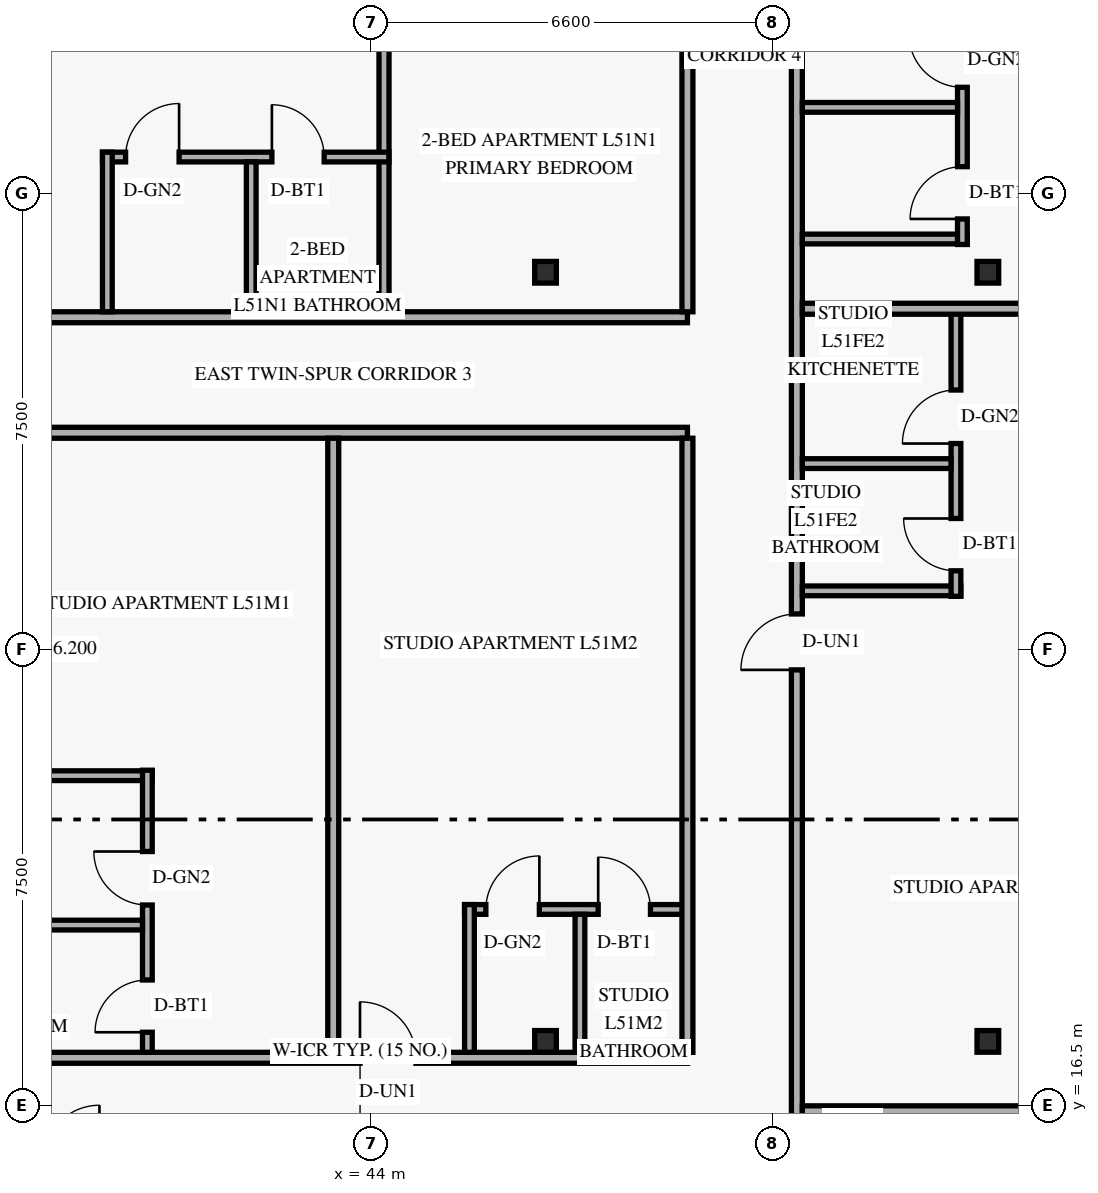
"""IFC4 building model, lengths in metres.
Left out: names, types, materials, properties, quantities, classifications, styles, units other than length and angle.
Written with IfcOpenShell. Run it as: python <this file> out.ifc"""

import sys

from ifc_helpers import new_model, si_unit, direction, frame, frame_2d, origin, origin_2d, place, context, subcontext, project, spatial, rectangle, hollow_rectangle, extrude, element, fill, save


model = new_model("IFC4")
c1 = context("Model", 3, precision=1e-05, world=origin(), true_north=direction((0.0, 1.0)))
c2 = subcontext(c1, "Body", "Model", "MODEL_VIEW")
j1 = project(units=[si_unit("LENGTHUNIT", "METRE"), si_unit("PLANEANGLEUNIT", "RADIAN")], contexts=[c1])
p1 = place(None, origin())
s1 = spatial("IfcSite", under=j1, at=p1, CompositionType="ELEMENT")
p2 = place(p1, origin())
s2 = spatial("IfcBuilding", under=s1, at=p2, CompositionType="ELEMENT")
p3 = place(p2, frame((0.0, 0.0, 196.2)))
s3 = spatial("IfcBuildingStorey", under=s2, at=p3, CompositionType="ELEMENT", Elevation=196.2)
for number, where, z_axis, x_axis in (
    (1, (46.803, 17.55, 0.0), (0.035, 0.0, 0.999), (0.0, 1.0, 0.0)),
    (2, (46.803, 30.2, 0.0), (0.035, 0.0, 0.999), (0.0, 1.0, 0.0)),
):
    element("IfcColumn", number, at=place(p3, frame(where, z_axis=z_axis, x_axis=x_axis)), inside=s3, PredefinedType="COLUMN", context=c2, shape_type="SweptSolid", body=[
        extrude(hollow_rectangle(XDim=0.356, YDim=0.356, WallThickness=0.016, at=origin_2d()), origin(), (0.0, 0.0, 1.0), 3.602),
    ])
for number, where, z_axis, x_axis in (
    (3, (54.036, 17.55, 0.0), (0.058, 0.0, 0.998), (0.0, 1.0, 0.0)),
    (4, (54.036, 30.2, 0.0), (0.058, 0.0, 0.998), (0.0, 1.0, 0.0)),
):
    element("IfcColumn", number, at=place(p3, frame(where, z_axis=z_axis, x_axis=x_axis)), inside=s3, PredefinedType="COLUMN", context=c2, shape_type="SweptSolid", body=[
        extrude(hollow_rectangle(XDim=0.356, YDim=0.356, WallThickness=0.016, at=origin_2d()), origin(), (0.0, 0.0, 1.0), 3.606),
    ])
p4 = place(p3, frame((37.64, 17.28, 0.0), z_axis=(0.0, 0.0, 1.0), x_axis=(1.0, 0.0, 0.0)))
e5 = element("IfcWall", 5, at=p4, inside=s3, PredefinedType="STANDARD", context=c2, shape_type="SweptSolid", body=[
    extrude(rectangle(XDim=11.56, YDim=0.18, at=frame_2d((5.78, 0.0))), origin(), (0.0, 0.0, 1.0), 2.67),
])
p5 = place(p4, frame((6.175, 0.0, 0.0)))
e6 = element("IfcOpeningElement", 6, at=p5, cuts=e5, PredefinedType="OPENING", context=c2, shape_type="SweptSolid", body=[
    extrude(rectangle(XDim=0.92, YDim=2.15, at=frame_2d((0.46, 1.075))), frame((0.0, 0.1, 0.0), z_axis=(0.0, -1.0, 0.0), x_axis=(1.0, 0.0, 0.0)), (0.0, 0.0, 1.0), 0.2),
])
p6 = place(p3, frame((37.64, 27.56, 0.0), z_axis=(0.0, 0.0, 1.0), x_axis=(1.0, 0.0, 0.0)))
e7 = element("IfcWall", 7, at=p6, inside=s3, PredefinedType="STANDARD", context=c2, shape_type="SweptSolid", body=[
    extrude(rectangle(XDim=11.56, YDim=0.18, at=frame_2d((5.78, 0.0))), origin(), (0.0, 0.0, 1.0), 2.67),
])
p7 = place(p3, frame((35.51, 29.46, 0.0), z_axis=(0.0, 0.0, 1.0), x_axis=(1.0, 0.0, 0.0)))
e8 = element("IfcWall", 8, at=p7, inside=s3, PredefinedType="STANDARD", context=c2, shape_type="SweptSolid", body=[
    extrude(rectangle(XDim=13.69, YDim=0.18, at=frame_2d((6.845, 0.0))), origin(), (0.0, 0.0, 1.0), 2.67),
])
p8 = place(p7, frame((0.32, 0.0, 0.0)))
e9 = element("IfcOpeningElement", 9, at=p8, cuts=e8, PredefinedType="OPENING", context=c2, shape_type="SweptSolid", body=[
    extrude(rectangle(XDim=0.92, YDim=2.15, at=frame_2d((0.46, 1.075))), frame((0.0, 0.1, 0.0), z_axis=(0.0, -1.0, 0.0), x_axis=(1.0, 0.0, 0.0)), (0.0, 0.0, 1.0), 0.2),
])
p9 = place(p3, frame((44.21, 29.55, 0.0), z_axis=(0.0, 0.0, 1.0), x_axis=(0.0, 1.0, 0.0)))
e10 = element("IfcWall", 10, at=p9, inside=s3, PredefinedType="PARTITIONING", context=c2, shape_type="SweptSolid", body=[
    extrude(rectangle(XDim=14.17, YDim=0.165, at=frame_2d((7.085, 0.0))), origin(), (0.0, 0.0, 1.0), 2.67),
])
p10 = place(p9, frame((4.593, 0.0, 0.0)))
e11 = element("IfcOpeningElement", 11, at=p10, cuts=e10, PredefinedType="OPENING", context=c2, shape_type="SweptSolid", body=[
    extrude(rectangle(XDim=0.88, YDim=2.14, at=frame_2d((0.44, 1.07))), frame((0.0, 0.093, 0.0), z_axis=(0.0, -1.0, 0.0), x_axis=(1.0, 0.0, 0.0)), (0.0, 0.0, 1.0), 0.185),
])
p11 = place(p9, frame((10.47, 0.0, 0.0)))
e12 = element("IfcOpeningElement", 12, at=p11, cuts=e10, PredefinedType="OPENING", context=c2, shape_type="SweptSolid", body=[
    extrude(rectangle(XDim=0.88, YDim=2.14, at=frame_2d((0.44, 1.07))), frame((0.0, 0.093, 0.0), z_axis=(0.0, -1.0, 0.0), x_axis=(1.0, 0.0, 0.0)), (0.0, 0.0, 1.0), 0.185),
])
p12 = place(p3, frame((39.58, 32.095, 0.0), z_axis=(0.0, 0.0, 1.0), x_axis=(1.0, 0.0, 0.0)))
e13 = element("IfcWall", 13, at=p12, inside=s3, PredefinedType="PLUMBINGWALL", context=c2, shape_type="SweptSolid", body=[
    extrude(rectangle(XDim=4.71, YDim=0.16, at=frame_2d((2.355, 0.0))), origin(), (0.0, 0.0, 1.0), 3.3),
])
p13 = place(p12, frame((0.38, 0.0, 0.0)))
e14 = element("IfcOpeningElement", 14, at=p13, cuts=e13, PredefinedType="OPENING", context=c2, shape_type="SweptSolid", body=[
    extrude(rectangle(XDim=0.88, YDim=2.12, at=frame_2d((0.44, 1.06))), frame((0.0, 0.09, 0.0), z_axis=(0.0, -1.0, 0.0), x_axis=(1.0, 0.0, 0.0)), (0.0, 0.0, 1.0), 0.18),
])
p14 = place(p12, frame((2.786, 0.0, 0.0)))
e15 = element("IfcOpeningElement", 15, at=p14, cuts=e13, PredefinedType="OPENING", context=c2, shape_type="SweptSolid", body=[
    extrude(rectangle(XDim=0.86, YDim=2.12, at=frame_2d((0.43, 1.06))), frame((0.0, 0.09, 0.0), z_axis=(0.0, -1.0, 0.0), x_axis=(1.0, 0.0, 0.0)), (0.0, 0.0, 1.0), 0.18),
])
p15 = place(p3, frame((39.66, 29.55, 0.0), z_axis=(0.0, 0.0, 1.0), x_axis=(0.0, 1.0, 0.0)))
e16 = element("IfcWall", 16, at=p15, inside=s3, PredefinedType="PLUMBINGWALL", context=c2, shape_type="SweptSolid", body=[
    extrude(rectangle(XDim=2.625, YDim=0.16, at=frame_2d((1.312, 0.0))), origin(), (0.0, 0.0, 1.0), 2.67),
])
p16 = place(p3, frame((42.026, 29.55, 0.0), z_axis=(0.0, 0.0, 1.0), x_axis=(0.0, 1.0, 0.0)))
e17 = element("IfcWall", 17, at=p16, inside=s3, PredefinedType="PLUMBINGWALL", context=c2, shape_type="SweptSolid", body=[
    extrude(rectangle(XDim=2.465, YDim=0.16, at=frame_2d((1.232, 0.0))), origin(), (0.0, 0.0, 1.0), 2.67),
])
p17 = place(p3, frame((43.375, 17.37, 0.0), z_axis=(0.0, 0.0, 1.0), x_axis=(0.0, 1.0, 0.0)))
e18 = element("IfcWall", 18, at=p17, inside=s3, PredefinedType="PARTITIONING", context=c2, shape_type="SweptSolid", body=[
    extrude(rectangle(XDim=10.1, YDim=0.18, at=frame_2d((5.05, 0.0))), origin(), (0.0, 0.0, 1.0), 2.67),
])
p18 = place(p3, frame((37.64, 21.92, 0.0), z_axis=(0.0, 0.0, 1.0), x_axis=(1.0, 0.0, 0.0)))
e19 = element("IfcWall", 19, at=p18, inside=s3, PredefinedType="PLUMBINGWALL", context=c2, shape_type="SweptSolid", body=[
    extrude(rectangle(XDim=2.758, YDim=0.16, at=frame_2d((1.379, 0.0))), origin(), (0.0, 0.0, 1.0), 3.3),
])
p19 = place(p3, frame((40.318, 17.37, 0.0), z_axis=(0.0, 0.0, 1.0), x_axis=(0.0, 1.0, 0.0)))
e20 = element("IfcWall", 20, at=p19, inside=s3, PredefinedType="PLUMBINGWALL", context=c2, shape_type="SweptSolid", body=[
    extrude(rectangle(XDim=4.64, YDim=0.16, at=frame_2d((2.32, 0.0))), origin(), (0.0, 0.0, 1.0), 2.67),
])
p20 = place(p19, frame((0.33, 0.0, 0.0)))
e21 = element("IfcOpeningElement", 21, at=p20, cuts=e20, PredefinedType="OPENING", context=c2, shape_type="SweptSolid", body=[
    extrude(rectangle(XDim=0.86, YDim=2.12, at=frame_2d((0.43, 1.06))), frame((0.0, 0.09, 0.0), z_axis=(0.0, -1.0, 0.0), x_axis=(1.0, 0.0, 0.0)), (0.0, 0.0, 1.0), 0.18),
])
p21 = place(p19, frame((2.423, 0.0, 0.0)))
e22 = element("IfcOpeningElement", 22, at=p21, cuts=e20, PredefinedType="OPENING", context=c2, shape_type="SweptSolid", body=[
    extrude(rectangle(XDim=0.88, YDim=2.12, at=frame_2d((0.44, 1.06))), frame((0.0, 0.09, 0.0), z_axis=(0.0, -1.0, 0.0), x_axis=(1.0, 0.0, 0.0)), (0.0, 0.0, 1.0), 0.18),
])
p22 = place(p3, frame((37.64, 19.463, 0.0), z_axis=(0.0, 0.0, 1.0), x_axis=(1.0, 0.0, 0.0)))
e23 = element("IfcWall", 23, at=p22, inside=s3, PredefinedType="PLUMBINGWALL", context=c2, shape_type="SweptSolid", body=[
    extrude(rectangle(XDim=2.598, YDim=0.16, at=frame_2d((1.299, 0.0))), origin(), (0.0, 0.0, 1.0), 3.3),
])
p23 = place(p3, frame((45.535, 19.72, 0.0), z_axis=(0.0, 0.0, 1.0), x_axis=(1.0, 0.0, 0.0)))
e24 = element("IfcWall", 24, at=p23, inside=s3, PredefinedType="PLUMBINGWALL", context=c2, shape_type="SweptSolid", body=[
    extrude(rectangle(XDim=3.665, YDim=0.16, at=frame_2d((1.833, 0.0))), origin(), (0.0, 0.0, 1.0), 2.67),
])
p24 = place(p23, frame((0.35, 0.0, 0.0)))
e25 = element("IfcOpeningElement", 25, at=p24, cuts=e24, PredefinedType="OPENING", context=c2, shape_type="SweptSolid", body=[
    extrude(rectangle(XDim=0.88, YDim=2.12, at=frame_2d((0.44, 1.06))), frame((0.0, 0.09, 0.0), z_axis=(0.0, -1.0, 0.0), x_axis=(1.0, 0.0, 0.0)), (0.0, 0.0, 1.0), 0.18),
])
p25 = place(p23, frame((2.198, 0.0, 0.0)))
e26 = element("IfcOpeningElement", 26, at=p25, cuts=e24, PredefinedType="OPENING", context=c2, shape_type="SweptSolid", body=[
    extrude(rectangle(XDim=0.86, YDim=2.12, at=frame_2d((0.43, 1.06))), frame((0.0, 0.09, 0.0), z_axis=(0.0, -1.0, 0.0), x_axis=(1.0, 0.0, 0.0)), (0.0, 0.0, 1.0), 0.18),
])
p26 = place(p3, frame((45.615, 17.37, 0.0), z_axis=(0.0, 0.0, 1.0), x_axis=(0.0, 1.0, 0.0)))
e27 = element("IfcWall", 27, at=p26, inside=s3, PredefinedType="PLUMBINGWALL", context=c2, shape_type="SweptSolid", body=[
    extrude(rectangle(XDim=2.43, YDim=0.16, at=frame_2d((1.215, 0.0))), origin(), (0.0, 0.0, 1.0), 2.67),
])
p27 = place(p3, frame((47.432, 17.37, 0.0), z_axis=(0.0, 0.0, 1.0), x_axis=(0.0, 1.0, 0.0)))
e28 = element("IfcWall", 28, at=p27, inside=s3, PredefinedType="PLUMBINGWALL", context=c2, shape_type="SweptSolid", body=[
    extrude(rectangle(XDim=2.27, YDim=0.16, at=frame_2d((1.135, 0.0))), origin(), (0.0, 0.0, 1.0), 2.67),
])
p28 = place(p3, frame((51.0, 4.28, 0.0), z_axis=(0.0, 0.0, 1.0), x_axis=(0.0, 1.0, 0.0)))
e29 = element("IfcWall", 29, at=p28, inside=s3, PredefinedType="STANDARD", context=c2, shape_type="SweptSolid", body=[
    extrude(rectangle(XDim=39.44, YDim=0.18, at=frame_2d((19.72, 0.0))), origin(), (0.0, 0.0, 1.0), 2.67),
])
p29 = place(p28, frame((6.08, 0.0, 0.0)))
e30 = element("IfcOpeningElement", 30, at=p29, cuts=e29, PredefinedType="OPENING", context=c2, shape_type="SweptSolid", body=[
    extrude(rectangle(XDim=0.92, YDim=2.15, at=frame_2d((0.46, 1.075))), frame((0.0, 0.1, 0.0), z_axis=(0.0, -1.0, 0.0), x_axis=(1.0, 0.0, 0.0)), (0.0, 0.0, 1.0), 0.2),
])
p30 = place(p28, frame((19.38, 0.0, 0.0)))
e31 = element("IfcOpeningElement", 31, at=p30, cuts=e29, PredefinedType="OPENING", context=c2, shape_type="SweptSolid", body=[
    extrude(rectangle(XDim=0.92, YDim=2.15, at=frame_2d((0.46, 1.075))), frame((0.0, 0.1, 0.0), z_axis=(0.0, -1.0, 0.0), x_axis=(1.0, 0.0, 0.0)), (0.0, 0.0, 1.0), 0.2),
])
p31 = place(p28, frame((31.534, 0.0, 0.0)))
e32 = element("IfcOpeningElement", 32, at=p31, cuts=e29, PredefinedType="OPENING", context=c2, shape_type="SweptSolid", body=[
    extrude(rectangle(XDim=0.92, YDim=2.15, at=frame_2d((0.46, 1.075))), frame((0.0, 0.1, 0.0), z_axis=(0.0, -1.0, 0.0), x_axis=(1.0, 0.0, 0.0)), (0.0, 0.0, 1.0), 0.2),
])
p32 = place(p3, frame((49.2, 17.37, 0.0), z_axis=(0.0, 0.0, 1.0), x_axis=(0.0, 1.0, 0.0)))
e33 = element("IfcWall", 33, at=p32, inside=s3, PredefinedType="STANDARD", context=c2, shape_type="SweptSolid", body=[
    extrude(rectangle(XDim=10.1, YDim=0.18, at=frame_2d((5.05, 0.0))), origin(), (0.0, 0.0, 1.0), 2.67),
])
p33 = place(p3, frame((49.2, 29.55, 0.0), z_axis=(0.0, 0.0, 1.0), x_axis=(0.0, 1.0, 0.0)))
e34 = element("IfcWall", 34, at=p33, inside=s3, PredefinedType="STANDARD", context=c2, shape_type="SweptSolid", body=[
    extrude(rectangle(XDim=14.17, YDim=0.18, at=frame_2d((7.085, 0.0))), origin(), (0.0, 0.0, 1.0), 2.67),
])
p34 = place(p3, frame((53.57, 11.57, 0.0), z_axis=(0.0, 0.0, 1.0), x_axis=(0.0, 1.0, 0.0)))
e35 = element("IfcWall", 35, at=p34, inside=s3, PredefinedType="PLUMBINGWALL", context=c2, shape_type="SweptSolid", body=[
    extrude(rectangle(XDim=4.83, YDim=0.16, at=frame_2d((2.415, 0.0))), origin(), (0.0, 0.0, 1.0), 2.924),
])
p35 = place(p34, frame((0.42, 0.0, 0.0)))
e36 = element("IfcOpeningElement", 36, at=p35, cuts=e35, PredefinedType="OPENING", context=c2, shape_type="SweptSolid", body=[
    extrude(rectangle(XDim=0.86, YDim=2.12, at=frame_2d((0.43, 1.06))), frame((0.0, 0.09, 0.0), z_axis=(0.0, -1.0, 0.0), x_axis=(1.0, 0.0, 0.0)), (0.0, 0.0, 1.0), 0.18),
])
p36 = place(p34, frame((2.559, 0.0, 0.0)))
e37 = element("IfcOpeningElement", 37, at=p36, cuts=e35, PredefinedType="OPENING", context=c2, shape_type="SweptSolid", body=[
    extrude(rectangle(XDim=0.88, YDim=2.12, at=frame_2d((0.44, 1.06))), frame((0.0, 0.09, 0.0), z_axis=(0.0, -1.0, 0.0), x_axis=(1.0, 0.0, 0.0)), (0.0, 0.0, 1.0), 0.18),
])
p37 = place(p3, frame((51.09, 16.4, 0.0), z_axis=(0.0, 0.0, 1.0), x_axis=(1.0, 0.0, 0.0)))
e38 = element("IfcWall", 38, at=p37, inside=s3, PredefinedType="PARTITIONING", context=c2, shape_type="SweptSolid", body=[
    extrude(rectangle(XDim=7.23, YDim=0.18, at=frame_2d((3.615, 0.0))), origin(), (0.0, 0.0, 1.0), 2.819),
])
p38 = place(p3, frame((51.09, 24.96, 0.0), z_axis=(0.0, 0.0, 1.0), x_axis=(1.0, 0.0, 0.0)))
e39 = element("IfcWall", 39, at=p38, inside=s3, PredefinedType="PLUMBINGWALL", context=c2, shape_type="SweptSolid", body=[
    extrude(rectangle(XDim=2.606, YDim=0.16, at=frame_2d((1.303, 0.0))), origin(), (0.0, 0.0, 1.0), 2.743),
])
p39 = place(p3, frame((53.616, 24.87, 0.0), z_axis=(0.0, 0.0, 1.0), x_axis=(0.0, 1.0, 0.0)))
e40 = element("IfcWall", 40, at=p39, inside=s3, PredefinedType="PLUMBINGWALL", context=c2, shape_type="SweptSolid", body=[
    extrude(rectangle(XDim=4.73, YDim=0.16, at=frame_2d((2.365, 0.0))), origin(), (0.0, 0.0, 1.0), 2.743),
])
p40 = place(p39, frame((0.42, 0.0, 0.0)))
e41 = element("IfcOpeningElement", 41, at=p40, cuts=e40, PredefinedType="OPENING", context=c2, shape_type="SweptSolid", body=[
    extrude(rectangle(XDim=0.86, YDim=2.12, at=frame_2d((0.43, 1.06))), frame((0.0, 0.09, 0.0), z_axis=(0.0, -1.0, 0.0), x_axis=(1.0, 0.0, 0.0)), (0.0, 0.0, 1.0), 0.18),
])
p41 = place(p39, frame((2.513, 0.0, 0.0)))
e42 = element("IfcOpeningElement", 42, at=p41, cuts=e40, PredefinedType="OPENING", context=c2, shape_type="SweptSolid", body=[
    extrude(rectangle(XDim=0.88, YDim=2.12, at=frame_2d((0.44, 1.06))), frame((0.0, 0.09, 0.0), z_axis=(0.0, -1.0, 0.0), x_axis=(1.0, 0.0, 0.0)), (0.0, 0.0, 1.0), 0.18),
])
p42 = place(p3, frame((51.09, 27.053, 0.0), z_axis=(0.0, 0.0, 1.0), x_axis=(1.0, 0.0, 0.0)))
e43 = element("IfcWall", 43, at=p42, inside=s3, PredefinedType="PLUMBINGWALL", context=c2, shape_type="SweptSolid", body=[
    extrude(rectangle(XDim=2.446, YDim=0.16, at=frame_2d((1.223, 0.0))), origin(), (0.0, 0.0, 1.0), 2.743),
])
p43 = place(p3, frame((51.09, 29.6, 0.0), z_axis=(0.0, 0.0, 1.0), x_axis=(1.0, 0.0, 0.0)))
e44 = element("IfcWall", 44, at=p43, inside=s3, PredefinedType="PARTITIONING", context=c2, shape_type="SweptSolid", body=[
    extrude(rectangle(XDim=7.23, YDim=0.18, at=frame_2d((3.615, 0.0))), origin(), (0.0, 0.0, 1.0), 2.743),
])
p44 = place(p3, frame((51.09, 30.747, 0.0), z_axis=(0.0, 0.0, 1.0), x_axis=(1.0, 0.0, 0.0)))
e45 = element("IfcWall", 45, at=p44, inside=s3, PredefinedType="PLUMBINGWALL", context=c2, shape_type="SweptSolid", body=[
    extrude(rectangle(XDim=2.712, YDim=0.16, at=frame_2d((1.356, 0.0))), origin(), (0.0, 0.0, 1.0), 3.3),
])
p45 = place(p3, frame((53.722, 30.657, 0.0), z_axis=(0.0, 0.0, 1.0), x_axis=(0.0, 1.0, 0.0)))
e46 = element("IfcWall", 46, at=p45, inside=s3, PredefinedType="PLUMBINGWALL", context=c2, shape_type="SweptSolid", body=[
    extrude(rectangle(XDim=4.887, YDim=0.16, at=frame_2d((2.443, 0.0))), origin(), (0.0, 0.0, 1.0), 2.924),
])
p46 = place(p45, frame((0.42, 0.0, 0.0)))
e47 = element("IfcOpeningElement", 47, at=p46, cuts=e46, PredefinedType="OPENING", context=c2, shape_type="SweptSolid", body=[
    extrude(rectangle(XDim=0.86, YDim=2.12, at=frame_2d((0.43, 1.06))), frame((0.0, 0.09, 0.0), z_axis=(0.0, -1.0, 0.0), x_axis=(1.0, 0.0, 0.0)), (0.0, 0.0, 1.0), 0.18),
])
p47 = place(p45, frame((2.585, 0.0, 0.0)))
e48 = element("IfcOpeningElement", 48, at=p47, cuts=e46, PredefinedType="OPENING", context=c2, shape_type="SweptSolid", body=[
    extrude(rectangle(XDim=0.88, YDim=2.12, at=frame_2d((0.44, 1.06))), frame((0.0, 0.09, 0.0), z_axis=(0.0, -1.0, 0.0), x_axis=(1.0, 0.0, 0.0)), (0.0, 0.0, 1.0), 0.18),
])
p48 = place(p3, frame((51.09, 32.912, 0.0), z_axis=(0.0, 0.0, 1.0), x_axis=(1.0, 0.0, 0.0)))
e49 = element("IfcWall", 49, at=p48, inside=s3, PredefinedType="PLUMBINGWALL", context=c2, shape_type="SweptSolid", body=[
    extrude(rectangle(XDim=2.552, YDim=0.16, at=frame_2d((1.276, 0.0))), origin(), (0.0, 0.0, 1.0), 3.3),
])
p49 = place(p13, origin())
e50 = element("IfcDoor", 50, at=p49, inside=s3, OperationType="SINGLE_SWING_RIGHT", PredefinedType="DOOR", context=c2, shape_type="SweptSolid", body=[
    extrude(rectangle(XDim=0.88, YDim=2.12, at=frame_2d((0.44, 1.06))), frame((0.0, 0.025, 0.0), z_axis=(0.0, -1.0, 0.0), x_axis=(1.0, 0.0, 0.0)), (0.0, 0.0, 1.0), 0.05),
])
fill(e14, e50)
p50 = place(p14, origin())
e51 = element("IfcDoor", 51, at=p50, inside=s3, OperationType="SINGLE_SWING_LEFT", PredefinedType="DOOR", context=c2, shape_type="SweptSolid", body=[
    extrude(rectangle(XDim=0.86, YDim=2.12, at=frame_2d((0.43, 1.06))), frame((0.0, 0.025, 0.0), z_axis=(0.0, -1.0, 0.0), x_axis=(1.0, 0.0, 0.0)), (0.0, 0.0, 1.0), 0.05),
])
fill(e15, e51)
p51 = place(p20, origin())
e52 = element("IfcDoor", 52, at=p51, inside=s3, OperationType="SINGLE_SWING_LEFT", PredefinedType="DOOR", context=c2, shape_type="SweptSolid", body=[
    extrude(rectangle(XDim=0.86, YDim=2.12, at=frame_2d((0.43, 1.06))), frame((0.0, 0.025, 0.0), z_axis=(0.0, -1.0, 0.0), x_axis=(1.0, 0.0, 0.0)), (0.0, 0.0, 1.0), 0.05),
])
fill(e21, e52)
p52 = place(p21, origin())
e53 = element("IfcDoor", 53, at=p52, inside=s3, OperationType="SINGLE_SWING_RIGHT", PredefinedType="DOOR", context=c2, shape_type="SweptSolid", body=[
    extrude(rectangle(XDim=0.88, YDim=2.12, at=frame_2d((0.44, 1.06))), frame((0.0, 0.025, 0.0), z_axis=(0.0, -1.0, 0.0), x_axis=(1.0, 0.0, 0.0)), (0.0, 0.0, 1.0), 0.05),
])
fill(e22, e53)
p53 = place(p5, origin())
e54 = element("IfcDoor", 54, at=p53, inside=s3, OperationType="SINGLE_SWING_LEFT", PredefinedType="DOOR", context=c2, shape_type="SweptSolid", body=[
    extrude(rectangle(XDim=0.92, YDim=2.15, at=frame_2d((0.46, 1.075))), frame((0.0, 0.025, 0.0), z_axis=(0.0, -1.0, 0.0), x_axis=(1.0, 0.0, 0.0)), (0.0, 0.0, 1.0), 0.05),
])
fill(e6, e54)
p54 = place(p24, origin())
e55 = element("IfcDoor", 55, at=p54, inside=s3, OperationType="SINGLE_SWING_RIGHT", PredefinedType="DOOR", context=c2, shape_type="SweptSolid", body=[
    extrude(rectangle(XDim=0.88, YDim=2.12, at=frame_2d((0.44, 1.06))), frame((0.0, 0.025, 0.0), z_axis=(0.0, -1.0, 0.0), x_axis=(1.0, 0.0, 0.0)), (0.0, 0.0, 1.0), 0.05),
])
fill(e25, e55)
p55 = place(p25, origin())
e56 = element("IfcDoor", 56, at=p55, inside=s3, OperationType="SINGLE_SWING_LEFT", PredefinedType="DOOR", context=c2, shape_type="SweptSolid", body=[
    extrude(rectangle(XDim=0.86, YDim=2.12, at=frame_2d((0.43, 1.06))), frame((0.0, 0.025, 0.0), z_axis=(0.0, -1.0, 0.0), x_axis=(1.0, 0.0, 0.0)), (0.0, 0.0, 1.0), 0.05),
])
fill(e26, e56)
p56 = place(p30, origin())
e57 = element("IfcDoor", 57, at=p56, inside=s3, OperationType="SINGLE_SWING_LEFT", PredefinedType="DOOR", context=c2, shape_type="SweptSolid", body=[
    extrude(rectangle(XDim=0.92, YDim=2.15, at=frame_2d((0.46, 1.075))), frame((0.0, 0.025, 0.0), z_axis=(0.0, -1.0, 0.0), x_axis=(1.0, 0.0, 0.0)), (0.0, 0.0, 1.0), 0.05),
])
fill(e31, e57)
p57 = place(p40, origin())
e58 = element("IfcDoor", 58, at=p57, inside=s3, OperationType="SINGLE_SWING_RIGHT", PredefinedType="DOOR", context=c2, shape_type="SweptSolid", body=[
    extrude(rectangle(XDim=0.86, YDim=2.12, at=frame_2d((0.43, 1.06))), frame((0.0, 0.025, 0.0), z_axis=(0.0, -1.0, 0.0), x_axis=(1.0, 0.0, 0.0)), (0.0, 0.0, 1.0), 0.05),
])
fill(e41, e58)
p58 = place(p41, origin())
e59 = element("IfcDoor", 59, at=p58, inside=s3, OperationType="SINGLE_SWING_LEFT", PredefinedType="DOOR", context=c2, shape_type="SweptSolid", body=[
    extrude(rectangle(XDim=0.88, YDim=2.12, at=frame_2d((0.44, 1.06))), frame((0.0, 0.025, 0.0), z_axis=(0.0, -1.0, 0.0), x_axis=(1.0, 0.0, 0.0)), (0.0, 0.0, 1.0), 0.05),
])
fill(e42, e59)
p59 = place(p46, origin())
e60 = element("IfcDoor", 60, at=p59, inside=s3, OperationType="SINGLE_SWING_LEFT", PredefinedType="DOOR", context=c2, shape_type="SweptSolid", body=[
    extrude(rectangle(XDim=0.86, YDim=2.12, at=frame_2d((0.43, 1.06))), frame((0.0, 0.025, 0.0), z_axis=(0.0, -1.0, 0.0), x_axis=(1.0, 0.0, 0.0)), (0.0, 0.0, 1.0), 0.05),
])
fill(e47, e60)
p60 = place(p47, origin())
e61 = element("IfcDoor", 61, at=p60, inside=s3, OperationType="SINGLE_SWING_RIGHT", PredefinedType="DOOR", context=c2, shape_type="SweptSolid", body=[
    extrude(rectangle(XDim=0.88, YDim=2.12, at=frame_2d((0.44, 1.06))), frame((0.0, 0.025, 0.0), z_axis=(0.0, -1.0, 0.0), x_axis=(1.0, 0.0, 0.0)), (0.0, 0.0, 1.0), 0.05),
])
fill(e48, e61)
save(model, sys.argv[1])
